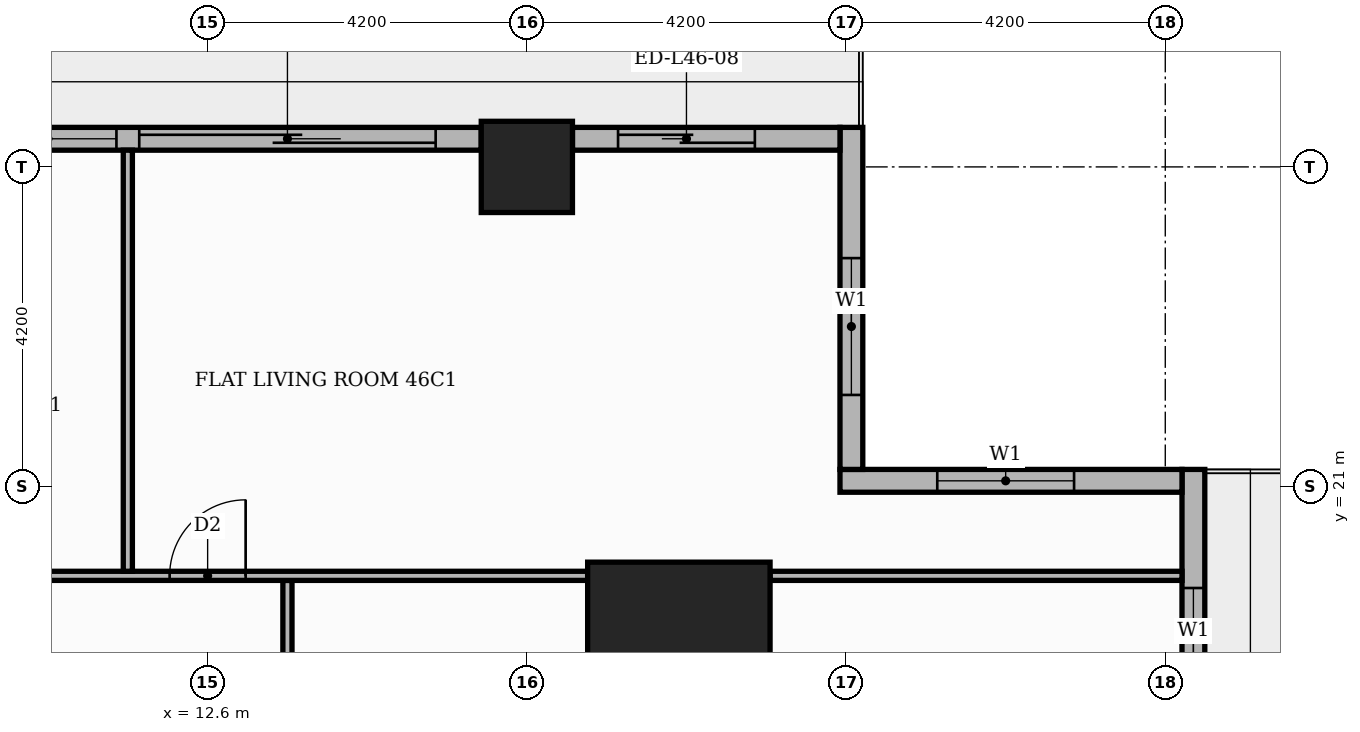
"""IFC4 building model, lengths in metres.
Left out: names, types, materials, properties, quantities, classifications, styles, units other than length and angle.
Written with IfcOpenShell. Run it as: python <this file> out.ifc"""

import sys

from ifc_helpers import new_model, si_unit, direction, frame, frame_2d, origin, origin_2d, place, context, subcontext, project, spatial, rectangle, extrude, element, fill, save


model = new_model("IFC4")
c1 = context("Model", 3, precision=1e-05, world=origin(), true_north=direction((0.0, 1.0)))
c2 = subcontext(c1, "Body", "Model", "MODEL_VIEW")
j1 = project(units=[si_unit("LENGTHUNIT", "METRE"), si_unit("PLANEANGLEUNIT", "RADIAN")], contexts=[c1])
p1 = place(None, origin())
s1 = spatial("IfcSite", under=j1, at=p1, CompositionType="ELEMENT")
p2 = place(p1, origin())
s2 = spatial("IfcBuilding", under=s1, at=p2, CompositionType="ELEMENT")
p3 = place(p2, frame((0.0, 0.0, 196.2)))
s3 = spatial("IfcBuildingStorey", under=s2, at=p3, CompositionType="ELEMENT", Elevation=196.2)
p4 = place(p3, frame((18.8, 18.8, 0.0), z_axis=(0.0, 0.0, 1.0), x_axis=(1.0, 0.0, 0.0)))
e1 = element("IfcColumn", 1, at=p4, inside=s3, PredefinedType="COLUMN", context=c2, shape_type="SweptSolid", body=[
    extrude(rectangle(XDim=2.4, YDim=2.4, at=origin_2d()), origin(), (0.0, 0.0, 1.0), 3.9),
])
p5 = place(p3, frame((16.8, 25.2, 0.0), z_axis=(0.0, 0.0, 1.0), x_axis=(1.0, 0.0, 0.0)))
e2 = element("IfcColumn", 2, at=p5, inside=s3, PredefinedType="COLUMN", context=c2, shape_type="SweptSolid", body=[
    extrude(rectangle(XDim=1.2, YDim=1.2, at=origin_2d()), origin(), (0.0, 0.0, 1.0), 3.9),
])
p6 = place(p3, frame((25.57, 17.4, 0.0), z_axis=(0.0, 0.0, 1.0), x_axis=(0.0, 1.0, 0.0)))
e3 = element("IfcWall", 3, at=p6, inside=s3, PredefinedType="STANDARD", context=c2, shape_type="SweptSolid", body=[
    extrude(rectangle(XDim=3.82, YDim=0.3, at=frame_2d((1.91, 0.0))), origin(), (0.0, 0.0, 1.0), 3.48),
])
p7 = place(p6, frame((0.46, 0.0, 0.9)))
e4 = element("IfcOpeningElement", 4, at=p7, cuts=e3, PredefinedType="OPENING", context=c2, shape_type="SweptSolid", body=[
    extrude(rectangle(XDim=1.8, YDim=2.1, at=frame_2d((0.9, 1.05))), frame((0.0, 0.16, 0.0), z_axis=(0.0, -1.0, 0.0), x_axis=(1.0, 0.0, 0.0)), (0.0, 0.0, 1.0), 0.32),
])
p8 = place(p3, frame((25.42, 21.07, 0.0), z_axis=(0.0, 0.0, 1.0), x_axis=(-1.0, 0.0, 0.0)))
e5 = element("IfcWall", 5, at=p8, inside=s3, PredefinedType="STANDARD", context=c2, shape_type="SweptSolid", body=[
    extrude(rectangle(XDim=4.5, YDim=0.3, at=frame_2d((2.25, 0.0))), origin(), (0.0, 0.0, 1.0), 3.48),
])
p9 = place(p8, frame((1.42, 0.0, 0.9)))
e6 = element("IfcOpeningElement", 6, at=p9, cuts=e5, PredefinedType="OPENING", context=c2, shape_type="SweptSolid", body=[
    extrude(rectangle(XDim=1.8, YDim=2.1, at=frame_2d((0.9, 1.05))), frame((0.0, 0.16, 0.0), z_axis=(0.0, -1.0, 0.0), x_axis=(1.0, 0.0, 0.0)), (0.0, 0.0, 1.0), 0.32),
])
p10 = place(p3, frame((21.07, 21.22, 0.0), z_axis=(0.0, 0.0, 1.0), x_axis=(0.0, 1.0, 0.0)))
e7 = element("IfcWall", 7, at=p10, inside=s3, PredefinedType="STANDARD", context=c2, shape_type="SweptSolid", body=[
    extrude(rectangle(XDim=4.5, YDim=0.3, at=frame_2d((2.25, 0.0))), origin(), (0.0, 0.0, 1.0), 3.48),
])
p11 = place(p10, frame((0.98, 0.0, 0.9)))
e8 = element("IfcOpeningElement", 8, at=p11, cuts=e7, PredefinedType="OPENING", context=c2, shape_type="SweptSolid", body=[
    extrude(rectangle(XDim=1.8, YDim=2.1, at=frame_2d((0.9, 1.05))), frame((0.0, 0.16, 0.0), z_axis=(0.0, -1.0, 0.0), x_axis=(1.0, 0.0, 0.0)), (0.0, 0.0, 1.0), 0.32),
])
p12 = place(p3, frame((20.92, 25.57, 0.0), z_axis=(0.0, 0.0, 1.0), x_axis=(-1.0, 0.0, 0.0)))
e9 = element("IfcWall", 9, at=p12, inside=s3, PredefinedType="STANDARD", context=c2, shape_type="SweptSolid", body=[
    extrude(rectangle(XDim=3.52, YDim=0.3, at=frame_2d((1.76, 0.0))), origin(), (0.0, 0.0, 1.0), 3.48),
])
p13 = place(p12, frame((1.12, 0.0, 0.0)))
e10 = element("IfcOpeningElement", 10, at=p13, cuts=e9, PredefinedType="OPENING", context=c2, shape_type="SweptSolid", body=[
    extrude(rectangle(XDim=1.8, YDim=2.4, at=frame_2d((0.9, 1.2))), frame((0.0, 0.16, 0.0), z_axis=(0.0, -1.0, 0.0), x_axis=(1.0, 0.0, 0.0)), (0.0, 0.0, 1.0), 0.32),
])
p14 = place(p3, frame((16.2, 25.57, 0.0), z_axis=(0.0, 0.0, 1.0), x_axis=(-1.0, 0.0, 0.0)))
e11 = element("IfcWall", 11, at=p14, inside=s3, PredefinedType="STANDARD", context=c2, shape_type="SweptSolid", body=[
    extrude(rectangle(XDim=7.2, YDim=0.3, at=frame_2d((3.6, 0.0))), origin(), (0.0, 0.0, 1.0), 3.48),
])
p15 = place(p14, frame((0.6, 0.0, 0.0)))
e12 = element("IfcOpeningElement", 12, at=p15, cuts=e11, PredefinedType="OPENING", context=c2, shape_type="SweptSolid", body=[
    extrude(rectangle(XDim=3.9, YDim=2.4, at=frame_2d((1.95, 1.2))), frame((0.0, 0.16, 0.0), z_axis=(0.0, -1.0, 0.0), x_axis=(1.0, 0.0, 0.0)), (0.0, 0.0, 1.0), 0.32),
])
p16 = place(p14, frame((4.8, 0.0, 0.9)))
e13 = element("IfcOpeningElement", 13, at=p16, cuts=e11, PredefinedType="OPENING", context=c2, shape_type="SweptSolid", body=[
    extrude(rectangle(XDim=1.8, YDim=2.1, at=frame_2d((0.9, 1.05))), frame((0.0, 0.16, 0.0), z_axis=(0.0, -1.0, 0.0), x_axis=(1.0, 0.0, 0.0)), (0.0, 0.0, 1.0), 0.32),
])
p17 = place(p3, frame((13.65, 13.75, 0.0), z_axis=(0.0, 0.0, 1.0), x_axis=(0.0, 1.0, 0.0)))
e14 = element("IfcWall", 14, at=p17, inside=s3, PredefinedType="PARTITIONING", context=c2, shape_type="SweptSolid", body=[
    extrude(rectangle(XDim=6.01, YDim=0.12, at=frame_2d((3.005, 0.0))), origin(), (0.0, 0.0, 1.0), 3.48),
])
p18 = place(p17, frame((2.535, 0.0, 0.0)))
e15 = element("IfcOpeningElement", 15, at=p18, cuts=e14, PredefinedType="OPENING", context=c2, shape_type="SweptSolid", body=[
    extrude(rectangle(XDim=0.9, YDim=2.1, at=frame_2d((0.45, 1.05))), frame((0.0, 0.07, 0.0), z_axis=(0.0, -1.0, 0.0), x_axis=(1.0, 0.0, 0.0)), (0.0, 0.0, 1.0), 0.14),
])
p19 = place(p3, frame((-13.55, 19.82, 0.0), z_axis=(0.0, 0.0, 1.0), x_axis=(1.0, 0.0, 0.0)))
e16 = element("IfcWall", 16, at=p19, inside=s3, PredefinedType="PARTITIONING", context=c2, shape_type="SweptSolid", body=[
    extrude(rectangle(XDim=31.15, YDim=0.12, at=frame_2d((15.575, 0.0))), origin(), (0.0, 0.0, 1.0), 3.48),
])
p20 = place(p19, frame((25.65, 0.0, 0.0)))
e17 = element("IfcOpeningElement", 17, at=p20, cuts=e16, PredefinedType="OPENING", context=c2, shape_type="SweptSolid", body=[
    extrude(rectangle(XDim=1.0, YDim=2.1, at=frame_2d((0.5, 1.05))), frame((0.0, 0.07, 0.0), z_axis=(0.0, -1.0, 0.0), x_axis=(1.0, 0.0, 0.0)), (0.0, 0.0, 1.0), 0.14),
])
p21 = place(p19, frame((22.55, 0.0, 0.0)))
e18 = element("IfcOpeningElement", 18, at=p21, cuts=e16, PredefinedType="OPENING", context=c2, shape_type="SweptSolid", body=[
    extrude(rectangle(XDim=0.9, YDim=2.1, at=frame_2d((0.45, 1.05))), frame((0.0, 0.07, 0.0), z_axis=(0.0, -1.0, 0.0), x_axis=(1.0, 0.0, 0.0)), (0.0, 0.0, 1.0), 0.14),
])
p22 = place(p19, frame((18.35, 0.0, 0.0)))
e19 = element("IfcOpeningElement", 19, at=p22, cuts=e16, PredefinedType="OPENING", context=c2, shape_type="SweptSolid", body=[
    extrude(rectangle(XDim=0.9, YDim=2.1, at=frame_2d((0.45, 1.05))), frame((0.0, 0.07, 0.0), z_axis=(0.0, -1.0, 0.0), x_axis=(1.0, 0.0, 0.0)), (0.0, 0.0, 1.0), 0.14),
])
p23 = place(p19, frame((9.95, 0.0, 0.0)))
e20 = element("IfcOpeningElement", 20, at=p23, cuts=e16, PredefinedType="OPENING", context=c2, shape_type="SweptSolid", body=[
    extrude(rectangle(XDim=0.9, YDim=2.1, at=frame_2d((0.45, 1.05))), frame((0.0, 0.07, 0.0), z_axis=(0.0, -1.0, 0.0), x_axis=(1.0, 0.0, 0.0)), (0.0, 0.0, 1.0), 0.14),
])
p24 = place(p19, frame((3.65, 0.0, 0.0)))
e21 = element("IfcOpeningElement", 21, at=p24, cuts=e16, PredefinedType="OPENING", context=c2, shape_type="SweptSolid", body=[
    extrude(rectangle(XDim=0.9, YDim=2.1, at=frame_2d((0.45, 1.05))), frame((0.0, 0.07, 0.0), z_axis=(0.0, -1.0, 0.0), x_axis=(1.0, 0.0, 0.0)), (0.0, 0.0, 1.0), 0.14),
])
p25 = place(p3, frame((20.0, 19.82, 0.0), z_axis=(0.0, 0.0, 1.0), x_axis=(1.0, 0.0, 0.0)))
e22 = element("IfcWall", 22, at=p25, inside=s3, PredefinedType="PARTITIONING", context=c2, shape_type="SweptSolid", body=[
    extrude(rectangle(XDim=5.42, YDim=0.12, at=frame_2d((2.71, 0.0))), origin(), (0.0, 0.0, 1.0), 3.48),
])
p26 = place(p3, frame((11.55, 19.88, 0.0), z_axis=(0.0, 0.0, 1.0), x_axis=(0.0, 1.0, 0.0)))
e23 = element("IfcWall", 23, at=p26, inside=s3, PredefinedType="PARTITIONING", context=c2, shape_type="SweptSolid", body=[
    extrude(rectangle(XDim=5.54, YDim=0.12, at=frame_2d((2.77, 0.0))), origin(), (0.0, 0.0, 1.0), 3.48),
])
p27 = place(p7, origin())
e24 = element("IfcWindow", 24, at=p27, inside=s3, PartitioningType="SINGLE_PANEL", PredefinedType="WINDOW", context=c2, shape_type="SweptSolid", body=[
    extrude(rectangle(XDim=1.8, YDim=2.1, at=frame_2d((0.9, 1.05))), frame((0.0, 0.03, 0.0), z_axis=(0.0, -1.0, 0.0), x_axis=(1.0, 0.0, 0.0)), (0.0, 0.0, 1.0), 0.06),
])
fill(e4, e24)
p28 = place(p9, origin())
e25 = element("IfcWindow", 25, at=p28, inside=s3, PartitioningType="SINGLE_PANEL", PredefinedType="WINDOW", context=c2, shape_type="SweptSolid", body=[
    extrude(rectangle(XDim=1.8, YDim=2.1, at=frame_2d((0.9, 1.05))), frame((0.0, 0.03, 0.0), z_axis=(0.0, -1.0, 0.0), x_axis=(1.0, 0.0, 0.0)), (0.0, 0.0, 1.0), 0.06),
])
fill(e6, e25)
p29 = place(p11, origin())
e26 = element("IfcWindow", 26, at=p29, inside=s3, PartitioningType="SINGLE_PANEL", PredefinedType="WINDOW", context=c2, shape_type="SweptSolid", body=[
    extrude(rectangle(XDim=1.8, YDim=2.1, at=frame_2d((0.9, 1.05))), frame((0.0, 0.03, 0.0), z_axis=(0.0, -1.0, 0.0), x_axis=(1.0, 0.0, 0.0)), (0.0, 0.0, 1.0), 0.06),
])
fill(e8, e26)
p30 = place(p13, origin())
e27 = element("IfcDoor", 27, at=p30, inside=s3, OperationType="SLIDING_TO_RIGHT", PredefinedType="DOOR", context=c2, shape_type="SweptSolid", body=[
    extrude(rectangle(XDim=1.8, YDim=2.4, at=frame_2d((0.9, 1.2))), frame((0.0, 0.025, 0.0), z_axis=(0.0, -1.0, 0.0), x_axis=(1.0, 0.0, 0.0)), (0.0, 0.0, 1.0), 0.05),
])
fill(e10, e27)
p31 = place(p15, origin())
e28 = element("IfcDoor", 28, at=p31, inside=s3, OperationType="SLIDING_TO_LEFT", PredefinedType="DOOR", context=c2, shape_type="SweptSolid", body=[
    extrude(rectangle(XDim=3.9, YDim=2.4, at=frame_2d((1.95, 1.2))), frame((0.0, 0.025, 0.0), z_axis=(0.0, -1.0, 0.0), x_axis=(1.0, 0.0, 0.0)), (0.0, 0.0, 1.0), 0.05),
])
fill(e12, e28)
p32 = place(p16, origin())
e29 = element("IfcWindow", 29, at=p32, inside=s3, PartitioningType="SINGLE_PANEL", PredefinedType="WINDOW", context=c2, shape_type="SweptSolid", body=[
    extrude(rectangle(XDim=1.8, YDim=2.1, at=frame_2d((0.9, 1.05))), frame((0.0, 0.03, 0.0), z_axis=(0.0, -1.0, 0.0), x_axis=(1.0, 0.0, 0.0)), (0.0, 0.0, 1.0), 0.06),
])
fill(e13, e29)
p33 = place(p20, origin())
e30 = element("IfcDoor", 30, at=p33, inside=s3, OperationType="SINGLE_SWING_RIGHT", PredefinedType="DOOR", context=c2, shape_type="SweptSolid", body=[
    extrude(rectangle(XDim=1.0, YDim=2.1, at=frame_2d((0.5, 1.05))), frame((0.0, 0.025, 0.0), z_axis=(0.0, -1.0, 0.0), x_axis=(1.0, 0.0, 0.0)), (0.0, 0.0, 1.0), 0.05),
])
fill(e17, e30)
save(model, sys.argv[1])
